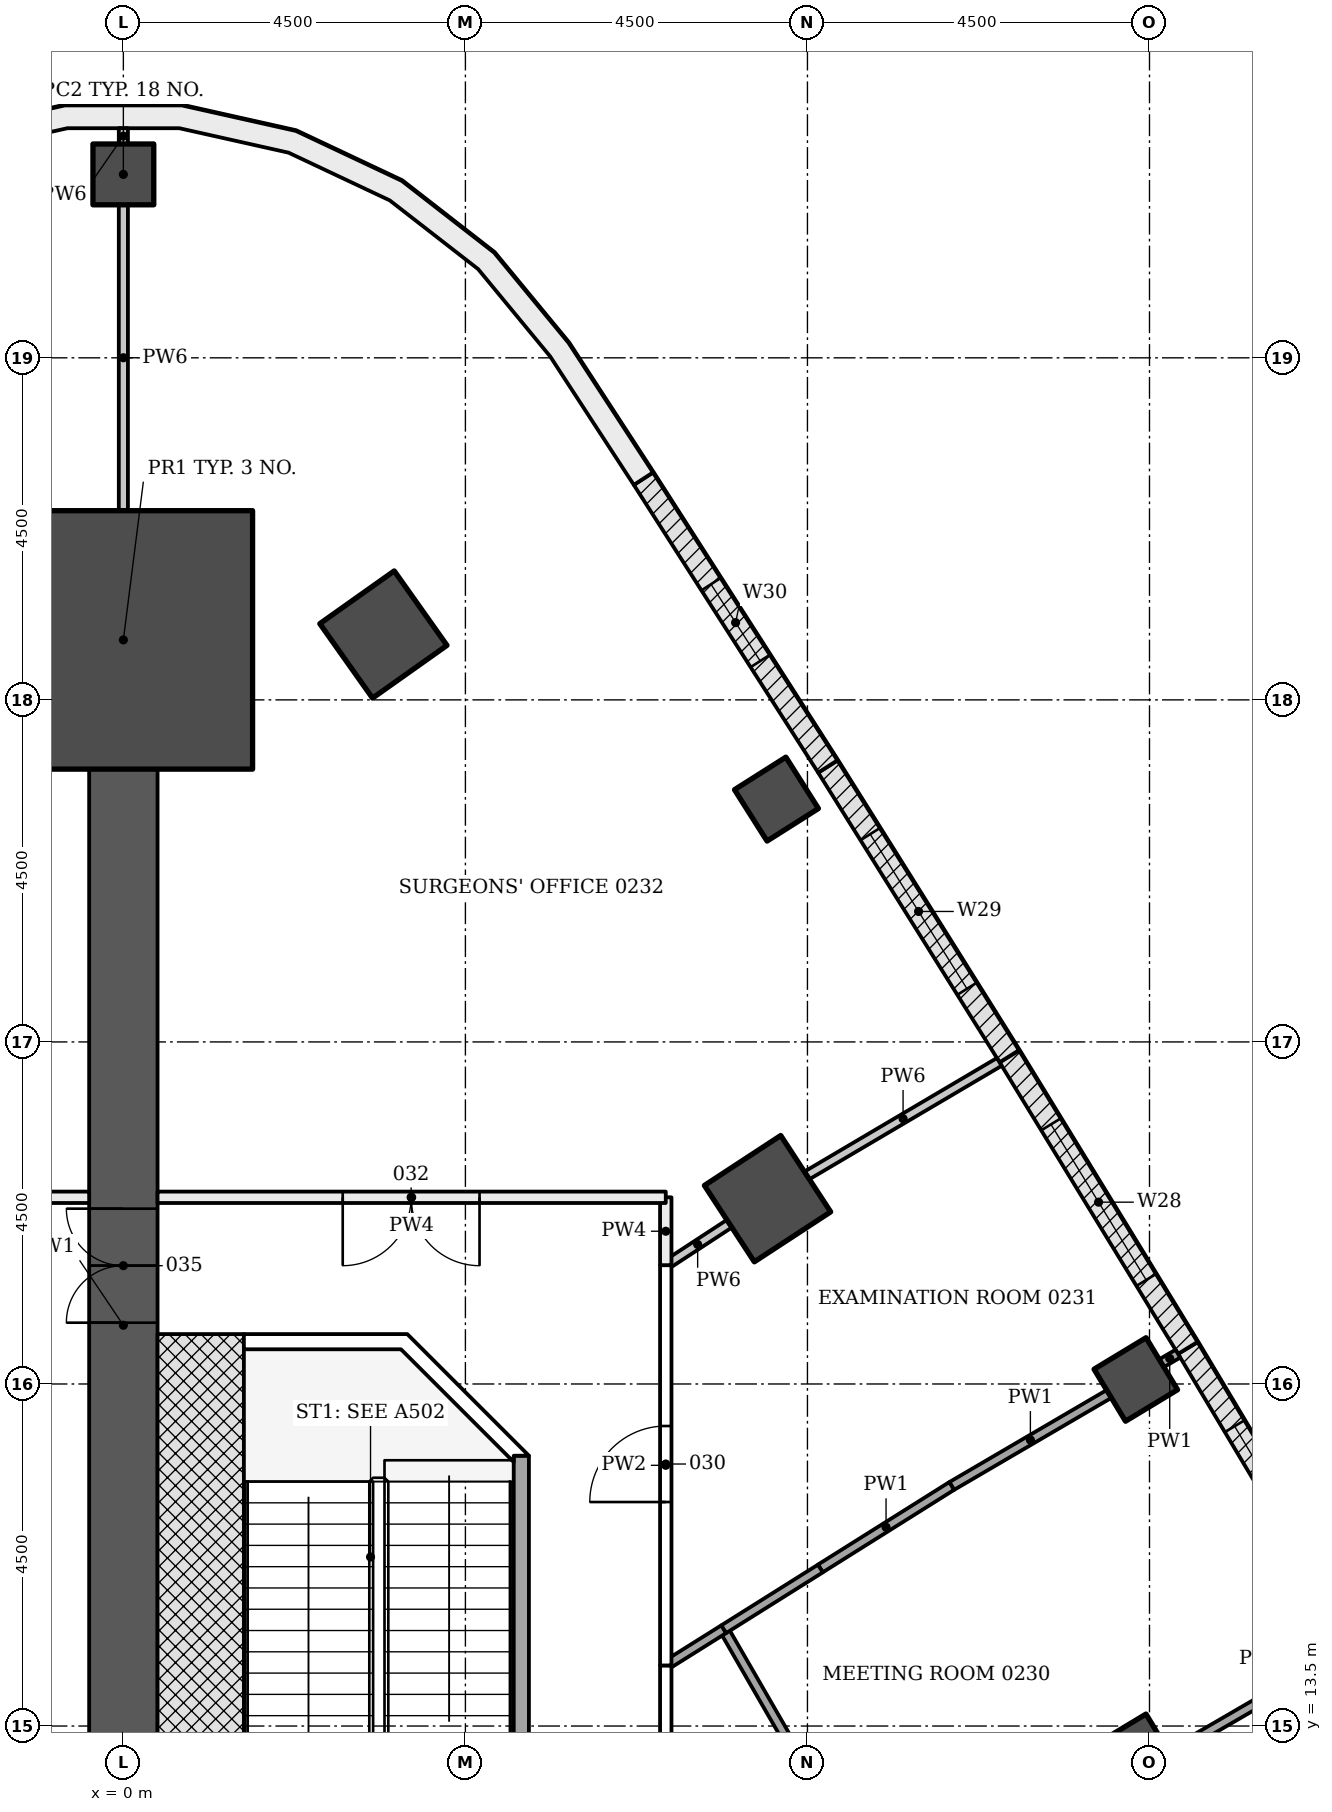
"""IFC4 building model, lengths in metres.
Left out: names, types, materials, properties, quantities, classifications, styles, units other than length and angle.
Written with IfcOpenShell. Run it as: python <this file> out.ifc"""

import sys

from ifc_helpers import new_model, si_unit, direction, frame, frame_2d, origin, origin_2d, place, context, subcontext, project, spatial, polyline, rectangle, outline, extrude, element, fill, save


model = new_model("IFC4")
c1 = context("Model", 3, precision=1e-05, world=origin(), true_north=direction((0.0, 1.0)))
c2 = subcontext(c1, "Body", "Model", "MODEL_VIEW")
j1 = project(units=[si_unit("LENGTHUNIT", "METRE"), si_unit("PLANEANGLEUNIT", "RADIAN")], contexts=[c1])
p1 = place(None, origin())
s1 = spatial("IfcSite", under=j1, at=p1, CompositionType="ELEMENT")
p2 = place(p1, origin())
s2 = spatial("IfcBuilding", under=s1, at=p2, CompositionType="ELEMENT")
p3 = place(p2, frame((0.0, 0.0, 10.5)))
s3 = spatial("IfcBuildingStorey", under=s2, at=p3, CompositionType="ELEMENT", Elevation=10.5)
for number, where, z_axis, x_axis in (
    (1, (13.25, 12.834, -0.25), (0.0, 0.0, 1.0), (0.857, 0.516, 0.0)),
    (2, (8.475, 20.438, -0.25), (0.0, 0.0, 1.0), (0.837, 0.547, 0.0)),
    (3, (3.421, 27.86, -0.25), (0.0, 0.0, 1.0), (0.816, 0.578, 0.0)),
):
    element("IfcColumn", number, at=place(p3, frame(where, z_axis=z_axis, x_axis=x_axis)), inside=s3, PredefinedType="COLUMN", context=c2, shape_type="SweptSolid", body=[
        extrude(rectangle(XDim=1.2, YDim=1.2, at=origin_2d()), origin(), (0.0, 0.0, 1.0), 4.5),
    ])
for number, where, z_axis, x_axis in (
    (4, (0.0, 33.913, -0.25), (0.0, 0.0, 1.0), (0.0, 1.0, 0.0)),
    (5, (13.32, 18.059, -0.25), (0.0, 0.0, 1.0), (0.856, 0.518, 0.0)),
    (6, (8.592, 25.695, -0.25), (0.0, 0.0, 1.0), (0.845, 0.535, 0.0)),
):
    element("IfcColumn", number, at=place(p3, frame(where, z_axis=z_axis, x_axis=x_axis)), inside=s3, PredefinedType="COLUMN", context=c2, shape_type="SweptSolid", body=[
        extrude(rectangle(XDim=0.8, YDim=0.8, at=origin_2d()), origin(), (0.0, 0.0, 1.0), 4.5),
    ])
p4 = place(p3, frame((0.0, 11.456, -0.25), z_axis=(0.0, 0.0, 1.0), x_axis=(0.0, 1.0, 0.0)))
e7 = element("IfcWall", 7, at=p4, inside=s3, PredefinedType="SHEAR", context=c2, shape_type="SweptSolid", body=[
    extrude(rectangle(XDim=14.633, YDim=0.9, at=frame_2d((7.316, 0.0))), origin(), (0.0, 0.0, 1.0), 4.5),
])
p5 = place(p4, frame((7.35, 0.0, 0.25)))
e8 = element("IfcOpeningElement", 8, at=p5, cuts=e7, PredefinedType="OPENING", context=c2, shape_type="SweptSolid", body=[
    extrude(rectangle(XDim=1.5, YDim=2.1, at=frame_2d((0.75, 1.05))), frame((0.0, 0.46, 0.0), z_axis=(0.0, -1.0, 0.0), x_axis=(1.0, 0.0, 0.0)), (0.0, 0.0, 1.0), 0.92),
])
p6 = place(p3, frame((0.0, 27.789, -0.25), z_axis=(0.0, 0.0, 1.0), x_axis=(0.0, 1.0, 0.0)))
e9 = element("IfcColumn", 9, at=p6, inside=s3, PredefinedType="COLUMN", context=c2, shape_type="SweptSolid", body=[
    extrude(rectangle(XDim=3.4, YDim=3.4, at=origin_2d()), origin(), (0.0, 0.0, 1.0), 4.5),
])
p7 = place(p3, frame((14.005, 18.472, 0.0), z_axis=(0.0, 0.0, 1.0), x_axis=(0.513257465408, -0.858234684805, 0.0)))
e10 = element("IfcWall", 10, at=p7, inside=s3, PredefinedType="NOTDEFINED", context=c2, shape_type="SweptSolid", body=[
    extrude(rectangle(XDim=4.496, YDim=0.3, at=frame_2d((2.248, 0.0))), origin(), (0.0, 0.0, 1.0), 4.25),
])
p8 = place(p7, frame((1.198, 0.0, 0.8)))
e11 = element("IfcOpeningElement", 11, at=p8, cuts=e10, PredefinedType="OPENING", context=c2, shape_type="SweptSolid", body=[
    extrude(rectangle(XDim=2.1, YDim=3.0, at=frame_2d((1.05, 1.5))), frame((0.0, 0.16, 0.0), z_axis=(0.0, -1.0, 0.0), x_axis=(1.0, 0.0, 0.0)), (0.0, 0.0, 1.0), 0.32),
])
p9 = place(p3, frame((11.656, 22.309, 0.0), z_axis=(0.0, 0.0, 1.0), x_axis=(0.522078085402, -0.852897691838, 0.0)))
e12 = element("IfcWall", 12, at=p9, inside=s3, PredefinedType="NOTDEFINED", context=c2, shape_type="SweptSolid", body=[
    extrude(rectangle(XDim=4.496, YDim=0.3, at=frame_2d((2.248, 0.0))), origin(), (0.0, 0.0, 1.0), 4.25),
])
p10 = place(p9, frame((1.048, 0.0, 0.9)))
e13 = element("IfcOpeningElement", 13, at=p10, cuts=e12, PredefinedType="OPENING", context=c2, shape_type="SweptSolid", body=[
    extrude(rectangle(XDim=2.4, YDim=2.4, at=frame_2d((1.2, 1.2))), frame((0.0, 0.16, 0.0), z_axis=(0.0, -1.0, 0.0), x_axis=(1.0, 0.0, 0.0)), (0.0, 0.0, 1.0), 0.32),
])
p11 = place(p3, frame((9.269, 26.122, 0.0), z_axis=(0.0, 0.0, 1.0), x_axis=(0.530804082031, -0.847494558389, 0.0)))
e14 = element("IfcWall", 14, at=p11, inside=s3, PredefinedType="NOTDEFINED", context=c2, shape_type="SweptSolid", body=[
    extrude(rectangle(XDim=4.496, YDim=0.3, at=frame_2d((2.248, 0.0))), origin(), (0.0, 0.0, 1.0), 4.25),
])
p12 = place(p11, frame((1.048, 0.0, 0.9)))
e15 = element("IfcOpeningElement", 15, at=p12, cuts=e14, PredefinedType="OPENING", context=c2, shape_type="SweptSolid", body=[
    extrude(rectangle(XDim=2.4, YDim=2.4, at=frame_2d((1.2, 1.2))), frame((0.0, 0.16, 0.0), z_axis=(0.0, -1.0, 0.0), x_axis=(1.0, 0.0, 0.0)), (0.0, 0.0, 1.0), 0.32),
])
p13 = place(p3, frame((6.842, 29.909, 0.0), z_axis=(0.0, 0.0, 1.0), x_axis=(0.539483537275, -0.841996147859, 0.0)))
e16 = element("IfcWall", 16, at=p13, inside=s3, PredefinedType="NOTDEFINED", context=c2, shape_type="SweptSolid", body=[
    extrude(rectangle(XDim=4.496, YDim=0.3, at=frame_2d((2.248, 0.0))), origin(), (0.0, 0.0, 1.0), 4.25),
])
p14 = place(p13, frame((1.648, 0.0, 0.8)))
e17 = element("IfcOpeningElement", 17, at=p14, cuts=e16, PredefinedType="OPENING", context=c2, shape_type="SweptSolid", body=[
    extrude(rectangle(XDim=1.2, YDim=3.0, at=frame_2d((0.6, 1.5))), frame((0.0, 0.16, 0.0), z_axis=(0.0, -1.0, 0.0), x_axis=(1.0, 0.0, 0.0)), (0.0, 0.0, 1.0), 0.32),
])
p15 = place(p3, origin())
e18 = element("IfcWall", 18, at=p15, inside=s3, PredefinedType="NOTDEFINED", context=c2, shape_type="SweptSolid", body=[
    extrude(outline(polyline([(6.967, 29.992), (5.857, 31.697), (4.878, 32.884), (3.663, 33.828), (2.271, 34.485), (0.769, 34.821), (-0.769, 34.821), (-2.271, 34.485), (-3.663, 33.828), (-4.878, 32.884), (-5.857, 31.697), (-6.967, 29.992), (-6.716, 29.828), (-5.615, 31.519), (-4.667, 32.667), (-3.505, 33.571), (-2.173, 34.199), (-0.736, 34.521), (0.736, 34.521), (2.173, 34.199), (3.505, 33.571), (4.667, 32.667), (5.615, 31.519), (6.716, 29.828), (6.967, 29.992)])), origin(), (0.0, 0.0, 1.0), 4.25),
])
p16 = place(p3, frame((5.236, 11.456, -0.25), z_axis=(0.0, 0.0, 1.0), x_axis=(0.0, 1.0, 0.0)))
e19 = element("IfcWall", 19, at=p16, inside=s3, PredefinedType="SHEAR", context=c2, shape_type="SweptSolid", body=[
    extrude(rectangle(XDim=5.6, YDim=0.2, at=frame_2d((2.8, 0.0))), origin(), (0.0, 0.0, 1.0), 4.5),
])
p17 = place(p16, frame((0.45, 0.0, 0.25)))
e20 = element("IfcOpeningElement", 20, at=p17, cuts=e19, PredefinedType="OPENING", context=c2, shape_type="SweptSolid", body=[
    extrude(rectangle(XDim=1.2, YDim=2.1, at=frame_2d((0.6, 1.05))), frame((0.0, 0.11, 0.0), z_axis=(0.0, -1.0, 0.0), x_axis=(1.0, 0.0, 0.0)), (0.0, 0.0, 1.0), 0.22),
])
p18 = place(p3, frame((1.018, 11.456, -0.25), z_axis=(0.0, 0.0, 1.0), x_axis=(0.0, 1.0, 0.0)))
e21 = element("IfcWall", 21, at=p18, inside=s3, PredefinedType="SHEAR", context=c2, shape_type="SweptSolid", body=[
    extrude(rectangle(XDim=7.2, YDim=1.136, at=frame_2d((3.6, 0.0))), origin(), (0.0, 0.0, 1.0), 4.5),
])
p19 = place(p3, frame((0.0, 0.0, -0.25)))
e22 = element("IfcWall", 22, at=p19, inside=s3, PredefinedType="SHEAR", context=c2, shape_type="SweptSolid", body=[
    extrude(outline(polyline([(5.336, 17.056), (3.736, 18.656), (1.586, 18.656), (1.586, 18.456), (3.653, 18.456), (5.135, 16.974), (5.135, 17.056), (5.135, 17.056), (5.135, 17.056), (5.135, 17.056), (5.135, 17.056), (5.135, 17.056), (5.135, 17.056), (5.135, 17.056), (5.135, 17.056), (5.135, 17.056), (5.135, 17.056), (5.135, 17.056), (5.135, 17.056), (5.135, 17.056), (5.135, 17.056), (5.135, 17.056), (5.135, 17.056), (5.336, 17.056)])), origin(), (0.0, 0.0, 1.0), 4.5),
])
p20 = place(p3, frame((7.136, 11.457, 0.0), z_axis=(0.0, 0.0, 1.0), x_axis=(0.0, 1.0, 0.0)))
e23 = element("IfcWall", 23, at=p20, inside=s3, PredefinedType="PARTITIONING", context=c2, shape_type="SweptSolid", body=[
    extrude(rectangle(XDim=2.84, YDim=0.15, at=frame_2d((1.42, 0.0))), origin(), (0.0, 0.0, 1.0), 3.638),
])
p21 = place(p3, frame((7.136, 14.297, 0.0), z_axis=(0.0, 0.0, 1.0), x_axis=(0.0, 1.0, 0.0)))
e24 = element("IfcWall", 24, at=p21, inside=s3, PredefinedType="PARTITIONING", context=c2, shape_type="SweptSolid", body=[
    extrude(rectangle(XDim=5.266, YDim=0.15, at=frame_2d((2.633, 0.0))), origin(), (0.0, 0.0, 1.0), 3.638),
])
p22 = place(p21, frame((2.15, 0.0, 0.0)))
e25 = element("IfcOpeningElement", 25, at=p22, cuts=e24, PredefinedType="OPENING", context=c2, shape_type="SweptSolid", body=[
    extrude(rectangle(XDim=1.0, YDim=2.1, at=frame_2d((0.5, 1.05))), frame((0.0, 0.085, 0.0), z_axis=(0.0, -1.0, 0.0), x_axis=(1.0, 0.0, 0.0)), (0.0, 0.0, 1.0), 0.17),
])
p23 = place(p3, frame((7.136, 19.563, 0.0), z_axis=(0.0, 0.0, 1.0), x_axis=(0.0, 1.0, 0.0)))
e26 = element("IfcWall", 26, at=p23, inside=s3, PredefinedType="PARTITIONING", context=c2, shape_type="SweptSolid", body=[
    extrude(rectangle(XDim=0.893, YDim=0.15, at=frame_2d((0.447, 0.0))), origin(), (0.0, 0.0, 1.0), 3.638),
])
p24 = place(p3, frame((7.136, 20.456, 0.0), z_axis=(0.0, 0.0, 1.0), x_axis=(-1.0, 0.0, 0.0)))
e27 = element("IfcWall", 27, at=p24, inside=s3, PredefinedType="PARTITIONING", context=c2, shape_type="SweptSolid", body=[
    extrude(rectangle(XDim=6.686, YDim=0.15, at=frame_2d((3.343, 0.0))), origin(), (0.0, 0.0, 1.0), 3.638),
])
p25 = place(p24, frame((2.45, 0.0, 0.0)))
e28 = element("IfcOpeningElement", 28, at=p25, cuts=e27, PredefinedType="OPENING", context=c2, shape_type="SweptSolid", body=[
    extrude(rectangle(XDim=1.8, YDim=2.1, at=frame_2d((0.9, 1.05))), frame((0.0, 0.085, 0.0), z_axis=(0.0, -1.0, 0.0), x_axis=(1.0, 0.0, 0.0)), (0.0, 0.0, 1.0), 0.17),
])
p26 = place(p3, frame((16.183, 14.538, 0.0), z_axis=(0.0, 0.0, 1.0), x_axis=(-0.864576979504, -0.50250039454, 0.0)))
e29 = element("IfcWall", 29, at=p26, inside=s3, PredefinedType="PARTITIONING", context=c2, shape_type="SweptSolid", body=[
    extrude(rectangle(XDim=2.792, YDim=0.12, at=frame_2d((1.396, 0.0))), origin(), (0.0, 0.0, 1.0), 3.633),
])
p27 = place(p3, frame((10.11, 10.943, 0.0), z_axis=(0.0, 0.0, 1.0), x_axis=(-0.49990879683, 0.866078053556, 0.0)))
e30 = element("IfcWall", 30, at=p27, inside=s3, PredefinedType="PARTITIONING", context=c2, shape_type="SweptSolid", body=[
    extrude(rectangle(XDim=4.423, YDim=0.12, at=frame_2d((2.211, 0.0))), origin(), (0.0, 0.0, 1.0), 3.638),
])
p28 = place(p27, frame((1.75, 0.0, 0.0)))
e31 = element("IfcOpeningElement", 31, at=p28, cuts=e30, PredefinedType="OPENING", context=c2, shape_type="SweptSolid", body=[
    extrude(rectangle(XDim=1.0, YDim=2.1, at=frame_2d((0.5, 1.05))), frame((0.0, 0.07, 0.0), z_axis=(0.0, -1.0, 0.0), x_axis=(1.0, 0.0, 0.0)), (0.0, 0.0, 1.0), 0.14),
])
p29 = place(p3, frame((7.899, 14.774, 0.0), z_axis=(0.0, 0.0, 1.0), x_axis=(-0.847402109943, -0.530951658877, 0.0)))
e32 = element("IfcWall", 32, at=p29, inside=s3, PredefinedType="PARTITIONING", context=c2, shape_type="SweptSolid", body=[
    extrude(rectangle(XDim=0.898, YDim=0.12, at=frame_2d((0.449, 0.0))), origin(), (0.0, 0.0, 1.0), 3.638),
])
p30 = place(p3, frame((-0.45, 20.456, 0.0), z_axis=(0.0, 0.0, 1.0), x_axis=(-1.0, 0.0, 0.0)))
e33 = element("IfcWall", 33, at=p30, inside=s3, PredefinedType="PARTITIONING", context=c2, shape_type="SweptSolid", body=[
    extrude(rectangle(XDim=1.8, YDim=0.15, at=frame_2d((0.9, 0.0))), origin(), (0.0, 0.0, 1.0), 3.638),
])
p31 = place(p3, frame((12.968, 17.869, 0.0), z_axis=(0.0, 0.0, 1.0), x_axis=(-0.863161652457, -0.504927679701, 0.0)))
e34 = element("IfcWall", 34, at=p31, inside=s3, PredefinedType="PARTITIONING", context=c2, shape_type="SweptSolid", body=[
    extrude(rectangle(XDim=2.398, YDim=0.12, at=frame_2d((1.199, 0.0))), origin(), (0.0, 0.0, 1.0), 3.638),
])
p32 = place(p3, frame((10.898, 16.658, 0.0), z_axis=(0.0, 0.0, 1.0), x_axis=(-0.846907532623, -0.531740191435, 0.0)))
e35 = element("IfcWall", 35, at=p32, inside=s3, PredefinedType="PARTITIONING", context=c2, shape_type="SweptSolid", body=[
    extrude(rectangle(XDim=2.04, YDim=0.12, at=frame_2d((1.02, 0.0))), origin(), (0.0, 0.0, 1.0), 3.638),
])
p33 = place(p3, frame((9.17, 15.572, 0.0), z_axis=(0.0, 0.0, 1.0), x_axis=(-0.846881470123, -0.531781699161, 0.0)))
e36 = element("IfcWall", 36, at=p33, inside=s3, PredefinedType="PARTITIONING", context=c2, shape_type="SweptSolid", body=[
    extrude(rectangle(XDim=1.501, YDim=0.12, at=frame_2d((0.75, 0.0))), origin(), (0.0, 0.0, 1.0), 3.638),
])
p34 = place(p3, frame((13.874, 18.399, 0.0), z_axis=(0.0, 0.0, 1.0), x_axis=(-0.863885093979, -0.503688936151, 0.0)))
e37 = element("IfcWall", 37, at=p34, inside=s3, PredefinedType="PARTITIONING", context=c2, shape_type="SweptSolid", body=[
    extrude(rectangle(XDim=0.25, YDim=0.12, at=frame_2d((0.125, 0.0))), origin(), (0.0, 0.0, 1.0), 4.25),
])
p35 = place(p3, frame((7.973, 20.109, 0.0), z_axis=(0.0, 0.0, 1.0), x_axis=(-0.836986858992, -0.547222987341, 0.0)))
e38 = element("IfcWall", 38, at=p35, inside=s3, PredefinedType="PARTITIONING", context=c2, shape_type="SweptSolid", body=[
    extrude(rectangle(XDim=0.998, YDim=0.12, at=frame_2d((0.499, 0.0))), origin(), (0.0, 0.0, 1.0), 3.638),
])
p36 = place(p3, frame((11.524, 22.237, 0.0), z_axis=(0.0, 0.0, 1.0), x_axis=(-0.861228913487, -0.508217235613, 0.0)))
e39 = element("IfcWall", 39, at=p36, inside=s3, PredefinedType="PARTITIONING", context=c2, shape_type="SweptSolid", body=[
    extrude(rectangle(XDim=2.94, YDim=0.12, at=frame_2d((1.47, 0.0))), origin(), (0.0, 0.0, 1.0), 3.633),
])
p37 = place(p3, frame((0.0, 29.489, 0.0), z_axis=(0.0, 0.0, 1.0), x_axis=(0.0, 1.0, 0.0)))
e40 = element("IfcWall", 40, at=p37, inside=s3, PredefinedType="PARTITIONING", context=c2, shape_type="SweptSolid", body=[
    extrude(rectangle(XDim=4.024, YDim=0.12, at=frame_2d((2.012, 0.0))), origin(), (0.0, 0.0, 1.0), 3.717),
])
p38 = place(p3, frame((0.0, 34.313, 0.0), z_axis=(0.0, 0.0, 1.0), x_axis=(0.0, 1.0, 0.0)))
e41 = element("IfcWall", 41, at=p38, inside=s3, PredefinedType="PARTITIONING", context=c2, shape_type="SweptSolid", body=[
    extrude(rectangle(XDim=0.208, YDim=0.12, at=frame_2d((0.104, 0.0))), origin(), (0.0, 0.0, 1.0), 4.25),
])
p39 = place(p8, origin())
e42 = element("IfcWindow", 42, at=p39, inside=s3, PartitioningType="DOUBLE_PANEL_HORIZONTAL", PredefinedType="WINDOW", context=c2, shape_type="SweptSolid", body=[
    extrude(rectangle(XDim=2.1, YDim=3.0, at=frame_2d((1.05, 1.5))), frame((0.0, 0.03, 0.0), z_axis=(0.0, -1.0, 0.0), x_axis=(1.0, 0.0, 0.0)), (0.0, 0.0, 1.0), 0.06),
])
fill(e11, e42)
p40 = place(p10, origin())
e43 = element("IfcWindow", 43, at=p40, inside=s3, PartitioningType="DOUBLE_PANEL_VERTICAL", PredefinedType="WINDOW", context=c2, shape_type="SweptSolid", body=[
    extrude(rectangle(XDim=2.4, YDim=2.4, at=frame_2d((1.2, 1.2))), frame((0.0, 0.03, 0.0), z_axis=(0.0, -1.0, 0.0), x_axis=(1.0, 0.0, 0.0)), (0.0, 0.0, 1.0), 0.06),
])
fill(e13, e43)
p41 = place(p12, origin())
e44 = element("IfcWindow", 44, at=p41, inside=s3, PartitioningType="DOUBLE_PANEL_VERTICAL", PredefinedType="WINDOW", context=c2, shape_type="SweptSolid", body=[
    extrude(rectangle(XDim=2.4, YDim=2.4, at=frame_2d((1.2, 1.2))), frame((0.0, 0.03, 0.0), z_axis=(0.0, -1.0, 0.0), x_axis=(1.0, 0.0, 0.0)), (0.0, 0.0, 1.0), 0.06),
])
fill(e15, e44)
p42 = place(p14, origin())
e45 = element("IfcWindow", 45, at=p42, inside=s3, PartitioningType="SINGLE_PANEL", PredefinedType="WINDOW", context=c2, shape_type="SweptSolid", body=[
    extrude(rectangle(XDim=1.2, YDim=3.0, at=frame_2d((0.6, 1.5))), frame((0.0, 0.03, 0.0), z_axis=(0.0, -1.0, 0.0), x_axis=(1.0, 0.0, 0.0)), (0.0, 0.0, 1.0), 0.06),
])
fill(e17, e45)
p43 = place(p22, origin())
e46 = element("IfcDoor", 46, at=p43, inside=s3, OperationType="SINGLE_SWING_LEFT", PredefinedType="DOOR", context=c2, shape_type="SweptSolid", body=[
    extrude(rectangle(XDim=1.0, YDim=2.1, at=frame_2d((0.5, 1.05))), frame((0.0, 0.025, 0.0), z_axis=(0.0, -1.0, 0.0), x_axis=(1.0, 0.0, 0.0)), (0.0, 0.0, 1.0), 0.05),
])
fill(e25, e46)
p44 = place(p25, origin())
e47 = element("IfcDoor", 47, at=p44, inside=s3, OperationType="DOUBLE_DOOR_SINGLE_SWING", PredefinedType="DOOR", context=c2, shape_type="SweptSolid", body=[
    extrude(rectangle(XDim=1.8, YDim=2.1, at=frame_2d((0.9, 1.05))), frame((0.0, 0.025, 0.0), z_axis=(0.0, -1.0, 0.0), x_axis=(1.0, 0.0, 0.0)), (0.0, 0.0, 1.0), 0.05),
])
fill(e28, e47)
p45 = place(p5, origin())
e48 = element("IfcDoor", 48, at=p45, inside=s3, OperationType="DOUBLE_DOOR_SINGLE_SWING", PredefinedType="DOOR", context=c2, shape_type="SweptSolid", body=[
    extrude(rectangle(XDim=1.5, YDim=2.1, at=frame_2d((0.75, 1.05))), frame((0.0, 0.025, 0.0), z_axis=(0.0, -1.0, 0.0), x_axis=(1.0, 0.0, 0.0)), (0.0, 0.0, 1.0), 0.05),
])
fill(e8, e48)
save(model, sys.argv[1])
